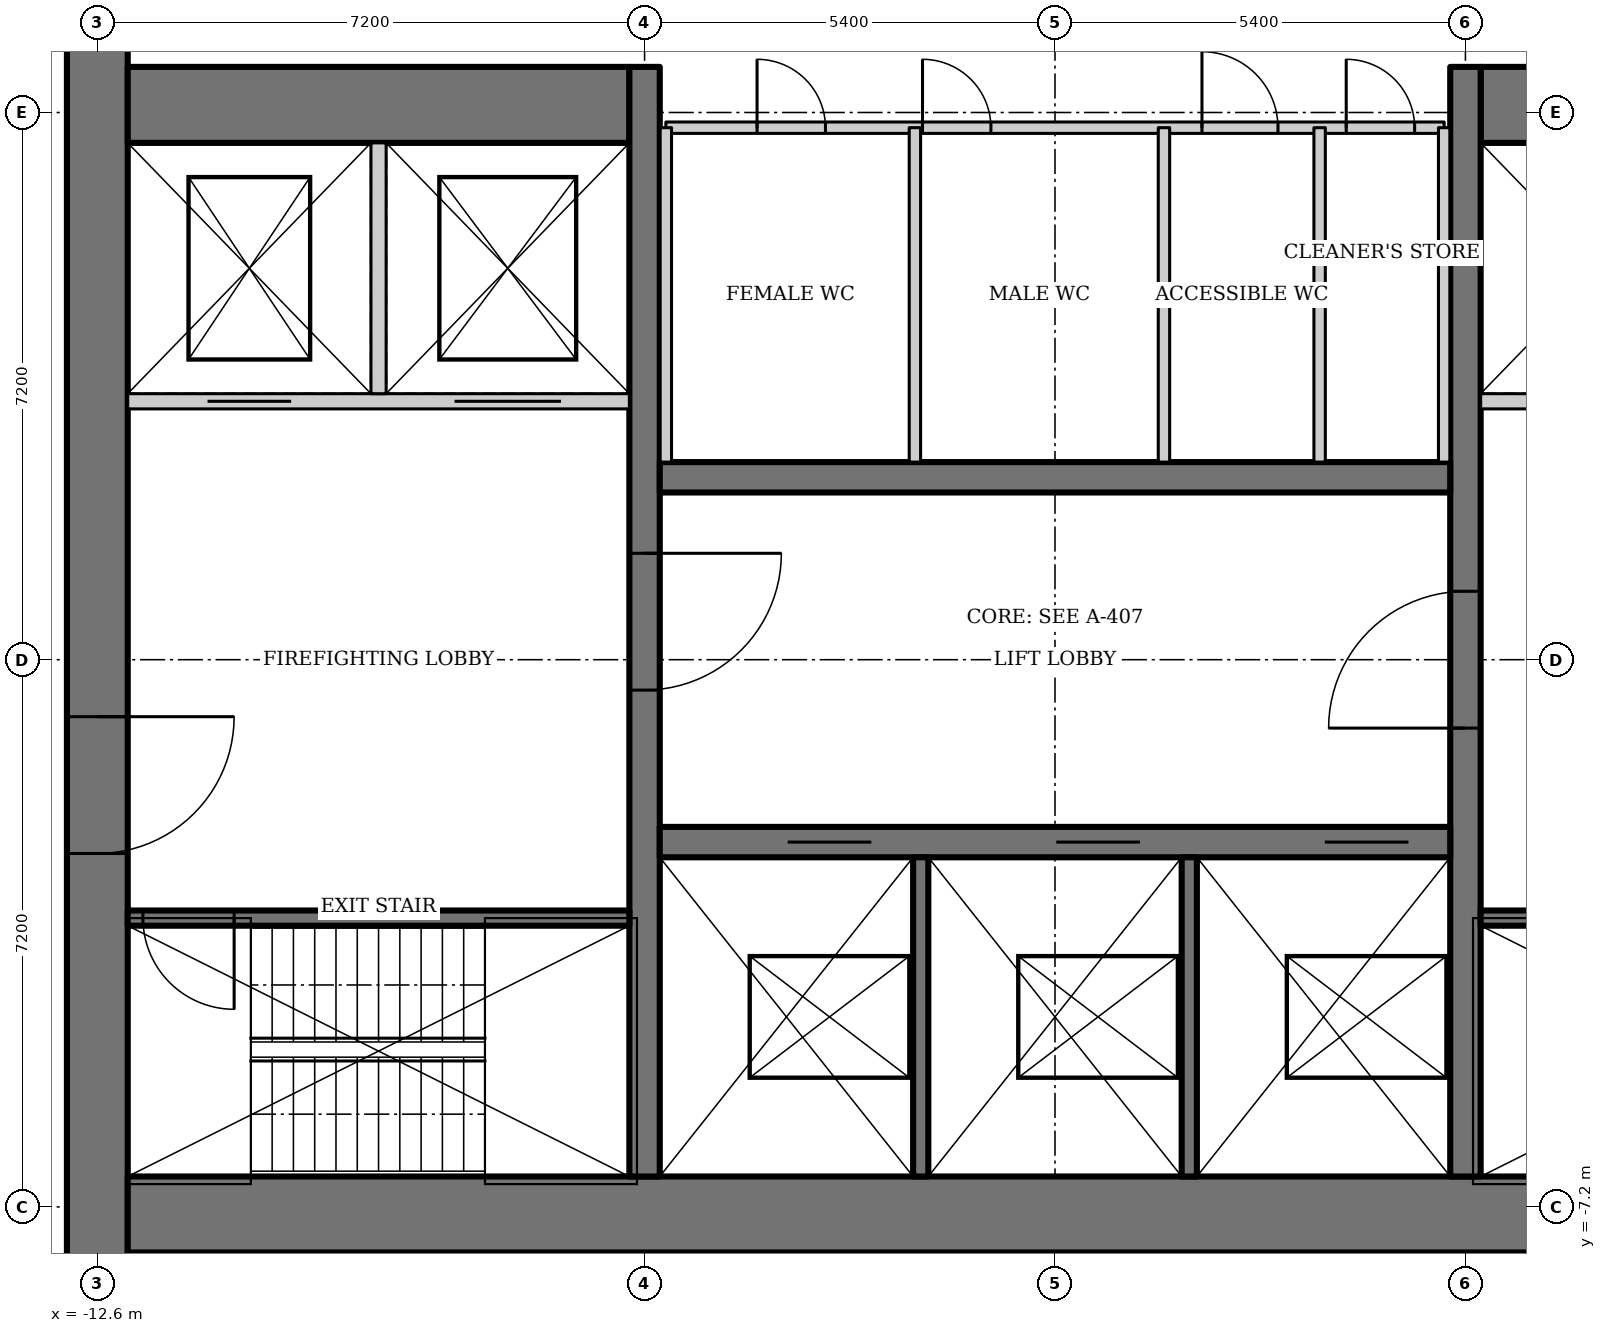
"""IFC4 building model, lengths in metres.
Left out: names, types, materials, properties, quantities, classifications, styles, units other than length and angle.
Written with IfcOpenShell. Run it as: python <this file> out.ifc"""

import sys

from ifc_helpers import new_model, si_unit, direction, frame, frame_2d, origin, place, context, subcontext, project, spatial, rectangle, extrude, element, fill, save


model = new_model("IFC4")
c1 = context("Model", 3, precision=1e-05, world=origin(), true_north=direction((0.0, 1.0)))
c2 = subcontext(c1, "Body", "Model", "MODEL_VIEW")
j1 = project(units=[si_unit("LENGTHUNIT", "METRE"), si_unit("PLANEANGLEUNIT", "RADIAN")], contexts=[c1])
p1 = place(None, origin())
s1 = spatial("IfcSite", under=j1, at=p1, CompositionType="ELEMENT")
p2 = place(p1, origin())
s2 = spatial("IfcBuilding", under=s1, at=p2, CompositionType="ELEMENT")
p3 = place(p2, frame((0.0, 0.0, 199.0)))
s3 = spatial("IfcBuildingStorey", under=s2, at=p3, CompositionType="ELEMENT", Elevation=199.0)
p4 = place(p3, frame((-12.6, 13.0, 0.0), z_axis=(0.0, 0.0, 1.0), x_axis=(0.0, -1.0, 0.0)))
e1 = element("IfcWall", 1, at=p4, inside=s3, PredefinedType="SHEAR", context=c2, shape_type="SweptSolid", body=[
    extrude(rectangle(XDim=26.0, YDim=0.8, at=frame_2d((13.0, 0.0))), origin(), (0.0, 0.0, 1.0), 4.2),
])
p5 = place(p4, frame((13.75, 0.0, 0.0)))
e2 = element("IfcOpeningElement", 2, at=p5, cuts=e1, PredefinedType="OPENING", context=c2, shape_type="SweptSolid", body=[
    extrude(rectangle(XDim=1.8, YDim=2.1, at=frame_2d((0.9, 1.05))), frame((0.0, 0.41, 0.0), z_axis=(0.0, -1.0, 0.0), x_axis=(1.0, 0.0, 0.0)), (0.0, 0.0, 1.0), 0.82),
])
p6 = place(p3, frame((-12.2, -7.3, 0.0), z_axis=(0.0, 0.0, 1.0), x_axis=(1.0, 0.0, 0.0)))
e3 = element("IfcWall", 3, at=p6, inside=s3, PredefinedType="SHEAR", context=c2, shape_type="SweptSolid", body=[
    extrude(rectangle(XDim=24.4, YDim=1.0, at=frame_2d((12.2, 0.0))), origin(), (0.0, 0.0, 1.0), 4.2),
])
for number, where, z_axis, x_axis in (
    (4, (12.2, 7.3, 0.0), (0.0, 0.0, 1.0), (-1.0, 0.0, 0.0)),
    (5, (-5.6, 7.3, 0.0), (0.0, 0.0, 1.0), (-1.0, 0.0, 0.0)),
):
    element("IfcWall", number, at=place(p3, frame(where, z_axis=z_axis, x_axis=x_axis)), inside=s3, PredefinedType="SHEAR", context=c2, shape_type="SweptSolid", body=[
        extrude(rectangle(XDim=6.6, YDim=1.0, at=frame_2d((3.3, 0.0))), origin(), (0.0, 0.0, 1.0), 4.2),
    ])
p7 = place(p3, frame((5.4, -6.8, 0.0), z_axis=(0.0, 0.0, 1.0), x_axis=(0.0, 1.0, 0.0)))
e6 = element("IfcWall", 6, at=p7, inside=s3, PredefinedType="SHEAR", context=c2, shape_type="SweptSolid", body=[
    extrude(rectangle(XDim=14.6, YDim=0.4, at=frame_2d((7.3, 0.0))), origin(), (0.0, 0.0, 1.0), 4.2),
])
p8 = place(p7, frame((5.9, 0.0, 0.0)))
e7 = element("IfcOpeningElement", 7, at=p8, cuts=e6, PredefinedType="OPENING", context=c2, shape_type="SweptSolid", body=[
    extrude(rectangle(XDim=1.8, YDim=2.1, at=frame_2d((0.9, 1.05))), frame((0.0, 0.21, 0.0), z_axis=(0.0, -1.0, 0.0), x_axis=(1.0, 0.0, 0.0)), (0.0, 0.0, 1.0), 0.42),
])
p9 = place(p3, frame((-5.4, 7.8, 0.0), z_axis=(0.0, 0.0, 1.0), x_axis=(0.0, -1.0, 0.0)))
e8 = element("IfcWall", 8, at=p9, inside=s3, PredefinedType="SHEAR", context=c2, shape_type="SweptSolid", body=[
    extrude(rectangle(XDim=14.6, YDim=0.4, at=frame_2d((7.3, 0.0))), origin(), (0.0, 0.0, 1.0), 4.2),
])
p10 = place(p9, frame((6.4, 0.0, 0.0)))
e9 = element("IfcOpeningElement", 9, at=p10, cuts=e8, PredefinedType="OPENING", context=c2, shape_type="SweptSolid", body=[
    extrude(rectangle(XDim=1.8, YDim=2.1, at=frame_2d((0.9, 1.05))), frame((0.0, 0.21, 0.0), z_axis=(0.0, -1.0, 0.0), x_axis=(1.0, 0.0, 0.0)), (0.0, 0.0, 1.0), 0.42),
])
p11 = place(p3, frame((-5.2, -2.4, 0.0), z_axis=(0.0, 0.0, 1.0), x_axis=(1.0, 0.0, 0.0)))
e10 = element("IfcWall", 10, at=p11, inside=s3, PredefinedType="SHEAR", context=c2, shape_type="SweptSolid", body=[
    extrude(rectangle(XDim=10.4, YDim=0.4, at=frame_2d((5.2, 0.0))), origin(), (0.0, 0.0, 1.0), 4.2),
])
p12 = place(p11, frame((1.683, 0.0, 0.0)))
e11 = element("IfcOpeningElement", 11, at=p12, cuts=e10, PredefinedType="OPENING", context=c2, shape_type="SweptSolid", body=[
    extrude(rectangle(XDim=1.1, YDim=2.2, at=frame_2d((0.55, 1.1))), frame((0.0, 0.21, 0.0), z_axis=(0.0, -1.0, 0.0), x_axis=(1.0, 0.0, 0.0)), (0.0, 0.0, 1.0), 0.42),
])
p13 = place(p11, frame((5.217, 0.0, 0.0)))
e12 = element("IfcOpeningElement", 12, at=p13, cuts=e10, PredefinedType="OPENING", context=c2, shape_type="SweptSolid", body=[
    extrude(rectangle(XDim=1.1, YDim=2.2, at=frame_2d((0.55, 1.1))), frame((0.0, 0.21, 0.0), z_axis=(0.0, -1.0, 0.0), x_axis=(1.0, 0.0, 0.0)), (0.0, 0.0, 1.0), 0.42),
])
p14 = place(p11, frame((8.75, 0.0, 0.0)))
e13 = element("IfcOpeningElement", 13, at=p14, cuts=e10, PredefinedType="OPENING", context=c2, shape_type="SweptSolid", body=[
    extrude(rectangle(XDim=1.1, YDim=2.2, at=frame_2d((0.55, 1.1))), frame((0.0, 0.21, 0.0), z_axis=(0.0, -1.0, 0.0), x_axis=(1.0, 0.0, 0.0)), (0.0, 0.0, 1.0), 0.42),
])
for number, where, z_axis, x_axis in (
    (14, (-1.767, -2.6, 0.0), (0.0, 0.0, 1.0), (0.0, -1.0, 0.0)),
    (15, (1.767, -2.6, 0.0), (0.0, 0.0, 1.0), (0.0, -1.0, 0.0)),
):
    element("IfcWall", number, at=place(p3, frame(where, z_axis=z_axis, x_axis=x_axis)), inside=s3, PredefinedType="SOLIDWALL", context=c2, shape_type="SweptSolid", body=[
        extrude(rectangle(XDim=4.2, YDim=0.2, at=frame_2d((2.1, 0.0))), origin(), (0.0, 0.0, 1.0), 4.2),
    ])
p15 = place(p3, frame((5.2, 2.4, 0.0), z_axis=(0.0, 0.0, 1.0), x_axis=(-1.0, 0.0, 0.0)))
e16 = element("IfcWall", 16, at=p15, inside=s3, PredefinedType="SHEAR", context=c2, shape_type="SweptSolid", body=[
    extrude(rectangle(XDim=10.4, YDim=0.4, at=frame_2d((5.2, 0.0))), origin(), (0.0, 0.0, 1.0), 4.2),
])
p16 = place(p3, frame((5.6, -3.4, 0.0), z_axis=(0.0, 0.0, 1.0), x_axis=(1.0, 0.0, 0.0)))
e17 = element("IfcWall", 17, at=p16, inside=s3, PredefinedType="SHEAR", context=c2, shape_type="SweptSolid", body=[
    extrude(rectangle(XDim=6.6, YDim=0.2, at=frame_2d((3.3, 0.0))), origin(), (0.0, 0.0, 1.0), 4.2),
])
p17 = place(p16, frame((5.2, 0.0, 0.0)))
e18 = element("IfcOpeningElement", 18, at=p17, cuts=e17, PredefinedType="OPENING", context=c2, shape_type="SweptSolid", body=[
    extrude(rectangle(XDim=1.2, YDim=2.1, at=frame_2d((0.6, 1.05))), frame((0.0, 0.11, 0.0), z_axis=(0.0, -1.0, 0.0), x_axis=(1.0, 0.0, 0.0)), (0.0, 0.0, 1.0), 0.22),
])
p18 = place(p3, frame((12.2, 3.4, 0.0), z_axis=(0.0, 0.0, 1.0), x_axis=(-1.0, 0.0, 0.0)))
e19 = element("IfcWall", 19, at=p18, inside=s3, PredefinedType="SOLIDWALL", context=c2, shape_type="SweptSolid", body=[
    extrude(rectangle(XDim=6.6, YDim=0.2, at=frame_2d((3.3, 0.0))), origin(), (0.0, 0.0, 1.0), 4.2),
])
p19 = place(p18, frame((4.45, 0.0, 0.0)))
e20 = element("IfcOpeningElement", 20, at=p19, cuts=e19, PredefinedType="OPENING", context=c2, shape_type="SweptSolid", body=[
    extrude(rectangle(XDim=1.1, YDim=2.2, at=frame_2d((0.55, 1.1))), frame((0.0, 0.11, 0.0), z_axis=(0.0, -1.0, 0.0), x_axis=(1.0, 0.0, 0.0)), (0.0, 0.0, 1.0), 0.22),
])
p20 = place(p18, frame((0.9, 0.0, 0.0)))
e21 = element("IfcOpeningElement", 21, at=p20, cuts=e19, PredefinedType="OPENING", context=c2, shape_type="SweptSolid", body=[
    extrude(rectangle(XDim=1.4, YDim=2.2, at=frame_2d((0.7, 1.1))), frame((0.0, 0.11, 0.0), z_axis=(0.0, -1.0, 0.0), x_axis=(1.0, 0.0, 0.0)), (0.0, 0.0, 1.0), 0.22),
])
p21 = place(p3, frame((-5.6, -3.4, 0.0), z_axis=(0.0, 0.0, 1.0), x_axis=(-1.0, 0.0, 0.0)))
e22 = element("IfcWall", 22, at=p21, inside=s3, PredefinedType="SHEAR", context=c2, shape_type="SweptSolid", body=[
    extrude(rectangle(XDim=6.6, YDim=0.2, at=frame_2d((3.3, 0.0))), origin(), (0.0, 0.0, 1.0), 4.2),
])
p22 = place(p21, frame((5.2, 0.0, 0.0)))
e23 = element("IfcOpeningElement", 23, at=p22, cuts=e22, PredefinedType="OPENING", context=c2, shape_type="SweptSolid", body=[
    extrude(rectangle(XDim=1.2, YDim=2.1, at=frame_2d((0.6, 1.05))), frame((0.0, 0.11, 0.0), z_axis=(0.0, -1.0, 0.0), x_axis=(1.0, 0.0, 0.0)), (0.0, 0.0, 1.0), 0.22),
])
p23 = place(p3, frame((-12.2, 3.4, 0.0), z_axis=(0.0, 0.0, 1.0), x_axis=(1.0, 0.0, 0.0)))
e24 = element("IfcWall", 24, at=p23, inside=s3, PredefinedType="SOLIDWALL", context=c2, shape_type="SweptSolid", body=[
    extrude(rectangle(XDim=6.6, YDim=0.2, at=frame_2d((3.3, 0.0))), origin(), (0.0, 0.0, 1.0), 4.2),
])
p24 = place(p23, frame((1.05, 0.0, 0.0)))
e25 = element("IfcOpeningElement", 25, at=p24, cuts=e24, PredefinedType="OPENING", context=c2, shape_type="SweptSolid", body=[
    extrude(rectangle(XDim=1.1, YDim=2.2, at=frame_2d((0.55, 1.1))), frame((0.0, 0.11, 0.0), z_axis=(0.0, -1.0, 0.0), x_axis=(1.0, 0.0, 0.0)), (0.0, 0.0, 1.0), 0.22),
])
p25 = place(p23, frame((4.3, 0.0, 0.0)))
e26 = element("IfcOpeningElement", 26, at=p25, cuts=e24, PredefinedType="OPENING", context=c2, shape_type="SweptSolid", body=[
    extrude(rectangle(XDim=1.4, YDim=2.2, at=frame_2d((0.7, 1.1))), frame((0.0, 0.11, 0.0), z_axis=(0.0, -1.0, 0.0), x_axis=(1.0, 0.0, 0.0)), (0.0, 0.0, 1.0), 0.22),
])
p26 = place(p3, frame((-8.9, 3.5, 0.0), z_axis=(0.0, 0.0, 1.0), x_axis=(0.0, 1.0, 0.0)))
e27 = element("IfcWall", 27, at=p26, inside=s3, PredefinedType="SOLIDWALL", context=c2, shape_type="SweptSolid", body=[
    extrude(rectangle(XDim=3.3, YDim=0.2, at=frame_2d((1.65, 0.0))), origin(), (0.0, 0.0, 1.0), 4.2),
])
p27 = place(p3, frame((-5.12, 7.0, 0.0), z_axis=(0.0, 0.0, 1.0), x_axis=(1.0, 0.0, 0.0)))
e28 = element("IfcWall", 28, at=p27, inside=s3, PredefinedType="SOLIDWALL", context=c2, shape_type="SweptSolid", body=[
    extrude(rectangle(XDim=10.24, YDim=0.15, at=frame_2d((5.12, 0.0))), origin(), (0.0, 0.0, 1.0), 4.05),
])
p28 = place(p27, frame((1.2, 0.0, 0.0)))
e29 = element("IfcOpeningElement", 29, at=p28, cuts=e28, PredefinedType="OPENING", context=c2, shape_type="SweptSolid", body=[
    extrude(rectangle(XDim=0.9, YDim=2.1, at=frame_2d((0.45, 1.05))), frame((0.0, 0.085, 0.0), z_axis=(0.0, -1.0, 0.0), x_axis=(1.0, 0.0, 0.0)), (0.0, 0.0, 1.0), 0.17),
])
p29 = place(p27, frame((3.377, 0.0, 0.0)))
e30 = element("IfcOpeningElement", 30, at=p29, cuts=e28, PredefinedType="OPENING", context=c2, shape_type="SweptSolid", body=[
    extrude(rectangle(XDim=0.9, YDim=2.1, at=frame_2d((0.45, 1.05))), frame((0.0, 0.085, 0.0), z_axis=(0.0, -1.0, 0.0), x_axis=(1.0, 0.0, 0.0)), (0.0, 0.0, 1.0), 0.17),
])
p30 = place(p27, frame((7.054, 0.0, 0.0)))
e31 = element("IfcOpeningElement", 31, at=p30, cuts=e28, PredefinedType="OPENING", context=c2, shape_type="SweptSolid", body=[
    extrude(rectangle(XDim=1.0, YDim=2.1, at=frame_2d((0.5, 1.05))), frame((0.0, 0.085, 0.0), z_axis=(0.0, -1.0, 0.0), x_axis=(1.0, 0.0, 0.0)), (0.0, 0.0, 1.0), 0.17),
])
p31 = place(p27, frame((8.952, 0.0, 0.0)))
e32 = element("IfcOpeningElement", 32, at=p31, cuts=e28, PredefinedType="OPENING", context=c2, shape_type="SweptSolid", body=[
    extrude(rectangle(XDim=0.9, YDim=2.1, at=frame_2d((0.45, 1.05))), frame((0.0, 0.085, 0.0), z_axis=(0.0, -1.0, 0.0), x_axis=(1.0, 0.0, 0.0)), (0.0, 0.0, 1.0), 0.17),
])
for number, where, z_axis, x_axis in (
    (33, (-5.12, 2.6, 0.0), (0.0, 0.0, 1.0), (0.0, 1.0, 0.0)),
    (34, (5.12, 2.6, 0.0), (0.0, 0.0, 1.0), (0.0, 1.0, 0.0)),
    (35, (-1.843, 2.6, 0.0), (0.0, 0.0, 1.0), (0.0, 1.0, 0.0)),
):
    element("IfcWall", number, at=place(p3, frame(where, z_axis=z_axis, x_axis=x_axis)), inside=s3, PredefinedType="SOLIDWALL", context=c2, shape_type="SweptSolid", body=[
        extrude(rectangle(XDim=4.4, YDim=0.15, at=frame_2d((2.2, 0.0))), origin(), (0.0, 0.0, 1.0), 4.05),
    ])
p32 = place(p3, frame((1.434, 2.6, 0.0), z_axis=(0.0, 0.0, 1.0), x_axis=(0.0, 1.0, 0.0)))
e36 = element("IfcWall", 36, at=p32, inside=s3, PredefinedType="SOLIDWALL", context=c2, shape_type="SweptSolid", body=[
    extrude(rectangle(XDim=4.4, YDim=0.15, at=frame_2d((2.2, 0.0))), origin(), (0.0, 0.0, 1.0), 3.108),
])
p33 = place(p3, frame((3.482, 2.6, 0.0), z_axis=(0.0, 0.0, 1.0), x_axis=(0.0, 1.0, 0.0)))
e37 = element("IfcWall", 37, at=p33, inside=s3, PredefinedType="SOLIDWALL", context=c2, shape_type="SweptSolid", body=[
    extrude(rectangle(XDim=4.4, YDim=0.15, at=frame_2d((2.2, 0.0))), origin(), (0.0, 0.0, 1.0), 4.05),
])
p34 = place(p8, origin())
e38 = element("IfcDoor", 38, at=p34, inside=s3, OperationType="DOUBLE_DOOR_DOUBLE_SWING", PredefinedType="DOOR", context=c2, shape_type="SweptSolid", body=[
    extrude(rectangle(XDim=1.8, YDim=2.1, at=frame_2d((0.9, 1.05))), frame((0.0, 0.025, 0.0), z_axis=(0.0, -1.0, 0.0), x_axis=(1.0, 0.0, 0.0)), (0.0, 0.0, 1.0), 0.05),
])
fill(e7, e38)
p35 = place(p10, origin())
e39 = element("IfcDoor", 39, at=p35, inside=s3, OperationType="DOUBLE_DOOR_DOUBLE_SWING", PredefinedType="DOOR", context=c2, shape_type="SweptSolid", body=[
    extrude(rectangle(XDim=1.8, YDim=2.1, at=frame_2d((0.9, 1.05))), frame((0.0, 0.025, 0.0), z_axis=(0.0, -1.0, 0.0), x_axis=(1.0, 0.0, 0.0)), (0.0, 0.0, 1.0), 0.05),
])
fill(e9, e39)
p36 = place(p22, origin())
e40 = element("IfcDoor", 40, at=p36, inside=s3, OperationType="SINGLE_SWING_RIGHT", PredefinedType="DOOR", context=c2, shape_type="SweptSolid", body=[
    extrude(rectangle(XDim=1.2, YDim=2.1, at=frame_2d((0.6, 1.05))), frame((0.0, 0.025, 0.0), z_axis=(0.0, -1.0, 0.0), x_axis=(1.0, 0.0, 0.0)), (0.0, 0.0, 1.0), 0.05),
])
fill(e23, e40)
p37 = place(p5, origin())
e41 = element("IfcDoor", 41, at=p37, inside=s3, OperationType="DOUBLE_DOOR_DOUBLE_SWING", PredefinedType="DOOR", context=c2, shape_type="SweptSolid", body=[
    extrude(rectangle(XDim=1.8, YDim=2.1, at=frame_2d((0.9, 1.05))), frame((0.0, 0.025, 0.0), z_axis=(0.0, -1.0, 0.0), x_axis=(1.0, 0.0, 0.0)), (0.0, 0.0, 1.0), 0.05),
])
fill(e2, e41)
p38 = place(p12, origin())
e42 = element("IfcDoor", 42, at=p38, inside=s3, OperationType="DOUBLE_DOOR_SLIDING", PredefinedType="DOOR", context=c2, shape_type="SweptSolid", body=[
    extrude(rectangle(XDim=1.1, YDim=2.2, at=frame_2d((0.55, 1.1))), frame((0.0, 0.025, 0.0), z_axis=(0.0, -1.0, 0.0), x_axis=(1.0, 0.0, 0.0)), (0.0, 0.0, 1.0), 0.05),
])
fill(e11, e42)
p39 = place(p13, origin())
e43 = element("IfcDoor", 43, at=p39, inside=s3, OperationType="DOUBLE_DOOR_SLIDING", PredefinedType="DOOR", context=c2, shape_type="SweptSolid", body=[
    extrude(rectangle(XDim=1.1, YDim=2.2, at=frame_2d((0.55, 1.1))), frame((0.0, 0.025, 0.0), z_axis=(0.0, -1.0, 0.0), x_axis=(1.0, 0.0, 0.0)), (0.0, 0.0, 1.0), 0.05),
])
fill(e12, e43)
p40 = place(p14, origin())
e44 = element("IfcDoor", 44, at=p40, inside=s3, OperationType="DOUBLE_DOOR_SLIDING", PredefinedType="DOOR", context=c2, shape_type="SweptSolid", body=[
    extrude(rectangle(XDim=1.1, YDim=2.2, at=frame_2d((0.55, 1.1))), frame((0.0, 0.025, 0.0), z_axis=(0.0, -1.0, 0.0), x_axis=(1.0, 0.0, 0.0)), (0.0, 0.0, 1.0), 0.05),
])
fill(e13, e44)
p41 = place(p24, origin())
e45 = element("IfcDoor", 45, at=p41, inside=s3, OperationType="DOUBLE_DOOR_SLIDING", PredefinedType="DOOR", context=c2, shape_type="SweptSolid", body=[
    extrude(rectangle(XDim=1.1, YDim=2.2, at=frame_2d((0.55, 1.1))), frame((0.0, 0.025, 0.0), z_axis=(0.0, -1.0, 0.0), x_axis=(1.0, 0.0, 0.0)), (0.0, 0.0, 1.0), 0.05),
])
fill(e25, e45)
p42 = place(p25, origin())
e46 = element("IfcDoor", 46, at=p42, inside=s3, OperationType="DOUBLE_DOOR_SLIDING", PredefinedType="DOOR", context=c2, shape_type="SweptSolid", body=[
    extrude(rectangle(XDim=1.4, YDim=2.2, at=frame_2d((0.7, 1.1))), frame((0.0, 0.025, 0.0), z_axis=(0.0, -1.0, 0.0), x_axis=(1.0, 0.0, 0.0)), (0.0, 0.0, 1.0), 0.05),
])
fill(e26, e46)
p43 = place(p28, origin())
e47 = element("IfcDoor", 47, at=p43, inside=s3, OperationType="SINGLE_SWING_LEFT", PredefinedType="DOOR", context=c2, shape_type="SweptSolid", body=[
    extrude(rectangle(XDim=0.9, YDim=2.1, at=frame_2d((0.45, 1.05))), frame((0.0, 0.025, 0.0), z_axis=(0.0, -1.0, 0.0), x_axis=(1.0, 0.0, 0.0)), (0.0, 0.0, 1.0), 0.05),
])
fill(e29, e47)
p44 = place(p29, origin())
e48 = element("IfcDoor", 48, at=p44, inside=s3, OperationType="SINGLE_SWING_LEFT", PredefinedType="DOOR", context=c2, shape_type="SweptSolid", body=[
    extrude(rectangle(XDim=0.9, YDim=2.1, at=frame_2d((0.45, 1.05))), frame((0.0, 0.025, 0.0), z_axis=(0.0, -1.0, 0.0), x_axis=(1.0, 0.0, 0.0)), (0.0, 0.0, 1.0), 0.05),
])
fill(e30, e48)
p45 = place(p30, origin())
e49 = element("IfcDoor", 49, at=p45, inside=s3, OperationType="SINGLE_SWING_LEFT", PredefinedType="DOOR", context=c2, shape_type="SweptSolid", body=[
    extrude(rectangle(XDim=1.0, YDim=2.1, at=frame_2d((0.5, 1.05))), frame((0.0, 0.025, 0.0), z_axis=(0.0, -1.0, 0.0), x_axis=(1.0, 0.0, 0.0)), (0.0, 0.0, 1.0), 0.05),
])
fill(e31, e49)
p46 = place(p31, origin())
e50 = element("IfcDoor", 50, at=p46, inside=s3, OperationType="SINGLE_SWING_LEFT", PredefinedType="DOOR", context=c2, shape_type="SweptSolid", body=[
    extrude(rectangle(XDim=0.9, YDim=2.1, at=frame_2d((0.45, 1.05))), frame((0.0, 0.025, 0.0), z_axis=(0.0, -1.0, 0.0), x_axis=(1.0, 0.0, 0.0)), (0.0, 0.0, 1.0), 0.05),
])
fill(e32, e50)
save(model, sys.argv[1])
